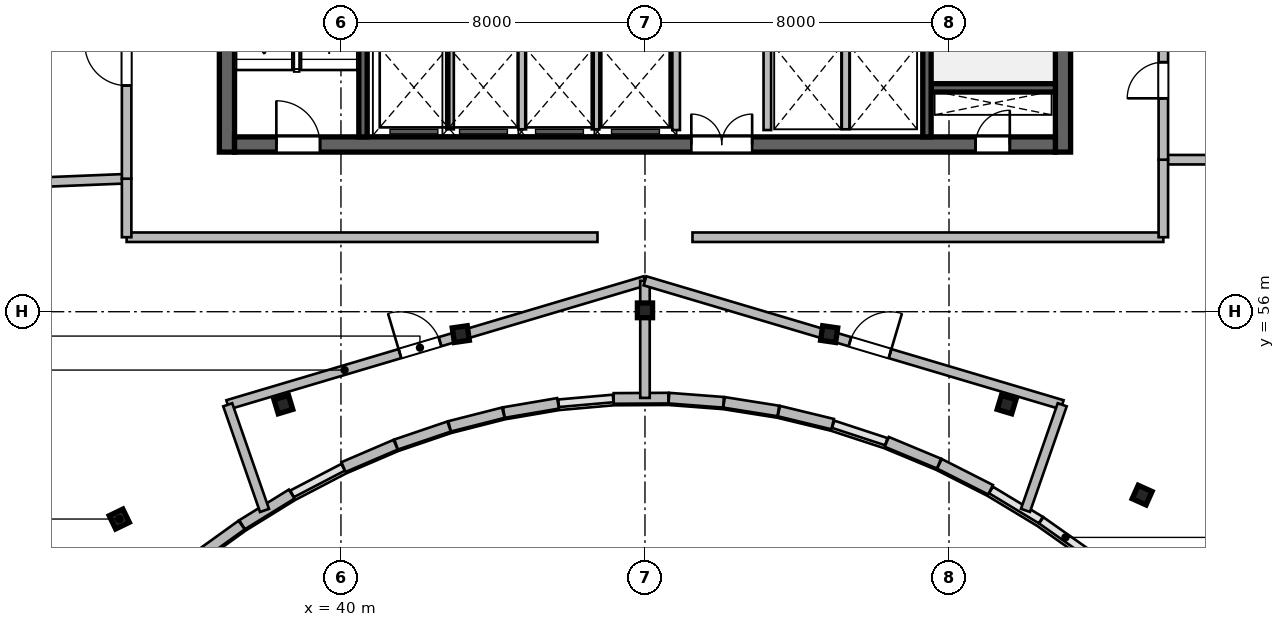
"""IFC4 building model, lengths in metres.
Left out: names, types, materials, properties, quantities, classifications, styles, units other than length and angle.
Written with IfcOpenShell. Run it as: python <this file> out.ifc"""

import sys

from ifc_helpers import new_model, si_unit, direction, frame, frame_2d, origin, origin_2d, place, context, subcontext, project, spatial, rectangle, i_section, extrude, source, transform, mapped, element, fill, save


model = new_model("IFC4")
c1 = context("Model", 3, precision=1e-05, world=origin(), true_north=direction((0.0, 1.0)))
c2 = subcontext(c1, "Body", "Model", "MODEL_VIEW")
j1 = project(units=[si_unit("LENGTHUNIT", "METRE"), si_unit("PLANEANGLEUNIT", "RADIAN")], contexts=[c1])
p1 = place(None, origin())
s1 = spatial("IfcSite", under=j1, at=p1, CompositionType="ELEMENT")
p2 = place(p1, origin())
s2 = spatial("IfcBuilding", under=s1, at=p2, CompositionType="ELEMENT")
p3 = place(p2, frame((0.0, 0.0, 291.3)))
s3 = spatial("IfcBuildingStorey", under=s2, at=p3, CompositionType="ELEMENT", Elevation=291.3)
m1 = source(origin(), c2, "Body", "SweptSolid", [
    extrude(rectangle(XDim=12.0, YDim=0.4, at=frame_2d((6.0, 0.0))), origin(), (0.0, 0.0, 1.0), 3.9),
])
for number, where, z_axis, x_axis in (
    (1, (37.0, 60.2, 0.0), (0.0, 0.0, 1.0), (0.0, 1.0, 0.0)),
    (2, (59.0, 60.2, 0.0), (0.0, 0.0, 1.0), (0.0, 1.0, 0.0)),
):
    element("IfcWall", number, at=place(p3, frame(where, z_axis=z_axis, x_axis=x_axis)), inside=s3, PredefinedType="SHEAR", context=c2, shape_type="MappedRepresentation", body=[
        mapped(m1, transform((0.0, 0.0, 0.0), scale=1.0)),
    ])
m2 = source(origin(), c2, "Body", "SweptSolid", [
    extrude(rectangle(XDim=21.6, YDim=0.4, at=frame_2d((10.8, 0.0))), origin(), (0.0, 0.0, 1.0), 3.9),
])
p4 = place(p3, frame((37.2, 60.4, 0.0), z_axis=(0.0, 0.0, 1.0), x_axis=(1.0, 0.0, 0.0)))
e3 = element("IfcWall", 3, at=p4, inside=s3, PredefinedType="SHEAR", context=c2, shape_type="MappedRepresentation", body=[
    mapped(m2, transform((0.0, 0.0, 0.0), scale=1.0)),
])
p5 = place(p4, frame((1.1, 0.0, 0.0)))
e4 = element("IfcOpeningElement", 4, at=p5, cuts=e3, PredefinedType="OPENING", context=c2, shape_type="SweptSolid", body=[
    extrude(rectangle(XDim=1.15, YDim=2.15, at=frame_2d((0.575, 1.075))), frame((0.0, 0.21, 0.0), z_axis=(0.0, -1.0, 0.0), x_axis=(1.0, 0.0, 0.0)), (0.0, 0.0, 1.0), 0.42),
])
p6 = place(p4, frame((19.5, 0.0, 0.0)))
e5 = element("IfcOpeningElement", 5, at=p6, cuts=e3, PredefinedType="OPENING", context=c2, shape_type="SweptSolid", body=[
    extrude(rectangle(XDim=0.9, YDim=2.1, at=frame_2d((0.45, 1.05))), frame((0.0, 0.21, 0.0), z_axis=(0.0, -1.0, 0.0), x_axis=(1.0, 0.0, 0.0)), (0.0, 0.0, 1.0), 0.42),
])
p7 = place(p4, frame((12.02, 0.0, 0.0)))
e6 = element("IfcOpeningElement", 6, at=p7, cuts=e3, PredefinedType="OPENING", context=c2, shape_type="SweptSolid", body=[
    extrude(rectangle(XDim=1.6, YDim=2.15, at=frame_2d((0.8, 1.075))), frame((0.0, 0.21, 0.0), z_axis=(0.0, -1.0, 0.0), x_axis=(1.0, 0.0, 0.0)), (0.0, 0.0, 1.0), 0.42),
])
m3 = source(origin(), c2, "Body", "SweptSolid", [
    extrude(rectangle(XDim=3.27, YDim=0.22, at=frame_2d((1.635, 0.0))), origin(), (0.0, 0.0, 1.0), 3.9),
])
p8 = place(p3, frame((55.53, 61.89, 0.0), z_axis=(0.0, 0.0, 1.0), x_axis=(1.0, 0.0, 0.0)))
e7 = element("IfcWall", 7, at=p8, inside=s3, PredefinedType="SHEAR", context=c2, shape_type="MappedRepresentation", body=[
    mapped(m3, transform((0.0, 0.0, 0.0), scale=1.0)),
])
m4 = source(origin(), c2, "Body", "SweptSolid", [
    extrude(rectangle(XDim=11.2, YDim=0.22, at=frame_2d((5.6, 0.0))), origin(), (0.0, 0.0, 1.0), 3.9),
])
p9 = place(p3, frame((40.58, 60.6, 0.0), z_axis=(0.0, 0.0, 1.0), x_axis=(0.0, 1.0, 0.0)))
e8 = element("IfcWall", 8, at=p9, inside=s3, PredefinedType="SHEAR", context=c2, shape_type="MappedRepresentation", body=[
    mapped(m4, transform((0.0, 0.0, 0.0), scale=1.0)),
])
p10 = place(p3, frame((55.42, 60.6, 0.0), z_axis=(0.0, 0.0, 1.0), x_axis=(0.0, 1.0, 0.0)))
e9 = element("IfcWall", 9, at=p10, inside=s3, PredefinedType="SHEAR", context=c2, shape_type="MappedRepresentation", body=[
    mapped(m4, transform((0.0, 0.0, 0.0), scale=1.0)),
])
p11 = place(p10, frame((9.645, 0.0, 0.0)))
e10 = element("IfcOpeningElement", 10, at=p11, cuts=e9, PredefinedType="OPENING", context=c2, shape_type="SweptSolid", body=[
    extrude(rectangle(XDim=1.15, YDim=2.15, at=frame_2d((0.575, 1.075))), frame((0.0, 0.12, 0.0), z_axis=(0.0, -1.0, 0.0), x_axis=(1.0, 0.0, 0.0)), (0.0, 0.0, 1.0), 0.24),
])
m5 = source(origin(), c2, "Body", "SweptSolid", [
    extrude(i_section(OverallWidth=0.399, OverallDepth=0.387, WebThickness=0.021, FlangeThickness=0.033, at=origin_2d()), origin(), (0.0, 0.0, 1.0), 3.9),
])
for number, where, z_axis, x_axis in (
    (11, (34.166, 50.545, 0.0), (0.0, 0.0, 1.0), (-0.436, 0.9, 0.0)),
    (12, (38.485, 53.558, 0.0), (0.0, 0.0, 1.0), (-0.289, 0.957, 0.0)),
    (13, (43.154, 55.411, 0.0), (0.0, 0.0, 1.0), (-0.143, 0.99, 0.0)),
    (14, (48.0, 56.036, 0.0), (0.0, 0.0, 1.0), (0.0, 1.0, 0.0)),
    (15, (52.846, 55.411, 0.0), (0.0, 0.0, 1.0), (0.143, 0.99, 0.0)),
    (16, (57.515, 53.558, 0.0), (0.0, 0.0, 1.0), (0.289, 0.957, 0.0)),
    (17, (61.082, 51.175, 0.0), (0.0, 0.0, 1.0), (0.409, 0.912, 0.0)),
):
    element("IfcColumn", number, at=place(p3, frame(where, z_axis=z_axis, x_axis=x_axis)), inside=s3, PredefinedType="COLUMN", context=c2, shape_type="MappedRepresentation", body=[
        mapped(m5, transform((0.0, 0.0, 0.0), scale=1.0)),
    ])
m6 = source(origin(), c2, "Body", "SweptSolid", [
    extrude(rectangle(XDim=1.509, YDim=0.28, at=frame_2d((0.754, 0.0))), origin(), (0.0, 0.0, 1.0), 3.64),
])
p12 = place(p3, frame((57.094, 51.315, 0.0), z_axis=(0.0, 0.0, 1.0), x_axis=(-0.89169189228, 0.452642871635, 0.0)))
e18 = element("IfcWall", 18, at=p12, inside=s3, PredefinedType="SOLIDWALL", context=c2, shape_type="MappedRepresentation", body=[
    mapped(m6, transform((0.0, 0.0, 0.0), scale=1.0)),
])
m7 = source(origin(), c2, "Body", "SweptSolid", [
    extrude(rectangle(XDim=1.488, YDim=0.28, at=frame_2d((0.744, 0.0))), origin(), (0.0, 0.0, 1.0), 3.64),
])
p13 = place(p3, frame((55.736, 52.004, 0.0), z_axis=(0.0, 0.0, 1.0), x_axis=(-0.923261314935, 0.384172545017, 0.0)))
e19 = element("IfcWall", 19, at=p13, inside=s3, PredefinedType="SOLIDWALL", context=c2, shape_type="MappedRepresentation", body=[
    mapped(m7, transform((0.0, 0.0, 0.0), scale=1.0)),
])
m8 = source(origin(), c2, "Body", "SweptSolid", [
    extrude(rectangle(XDim=1.457, YDim=0.28, at=frame_2d((0.728, 0.0))), origin(), (0.0, 0.0, 1.0), 3.64),
])
p14 = place(p3, frame((52.939, 53.042, 0.0), z_axis=(0.0, 0.0, 1.0), x_axis=(-0.97187219902, 0.23550887196, 0.0)))
e20 = element("IfcWall", 20, at=p14, inside=s3, PredefinedType="SOLIDWALL", context=c2, shape_type="MappedRepresentation", body=[
    mapped(m8, transform((0.0, 0.0, 0.0), scale=1.0)),
])
m9 = source(origin(), c2, "Body", "SweptSolid", [
    extrude(rectangle(XDim=1.446, YDim=0.28, at=frame_2d((0.723, 0.0))), origin(), (0.0, 0.0, 1.0), 3.64),
])
p15 = place(p3, frame((51.509, 53.388, 0.0), z_axis=(0.0, 0.0, 1.0), x_axis=(-0.987650460941, 0.156673440642, 0.0)))
e21 = element("IfcWall", 21, at=p15, inside=s3, PredefinedType="SOLIDWALL", context=c2, shape_type="MappedRepresentation", body=[
    mapped(m9, transform((0.0, 0.0, 0.0), scale=1.0)),
])
m10 = source(origin(), c2, "Body", "SweptSolid", [
    extrude(rectangle(XDim=1.44, YDim=0.28, at=frame_2d((0.72, 0.0))), origin(), (0.0, 0.0, 1.0), 3.64),
])
p16 = place(p3, frame((50.066, 53.616, 0.0), z_axis=(0.0, 0.0, 1.0), x_axis=(-0.997124860794, 0.075776064736, 0.0)))
e22 = element("IfcWall", 22, at=p16, inside=s3, PredefinedType="SOLIDWALL", context=c2, shape_type="MappedRepresentation", body=[
    mapped(m10, transform((0.0, 0.0, 0.0), scale=1.0)),
])
m11 = source(origin(), c2, "Body", "SweptSolid", [
    extrude(rectangle(XDim=1.438, YDim=0.28, at=frame_2d((0.719, 0.0))), origin(), (0.0, 0.0, 1.0), 3.64),
])
p17 = place(p3, frame((48.615, 53.726, 0.0), z_axis=(0.0, 0.0, 1.0), x_axis=(-0.999982357135, -0.005940153174, 0.0)))
e23 = element("IfcWall", 23, at=p17, inside=s3, PredefinedType="SOLIDWALL", context=c2, shape_type="MappedRepresentation", body=[
    mapped(m11, transform((0.0, 0.0, 0.0), scale=1.0)),
])
m12 = source(origin(), c2, "Body", "SweptSolid", [
    extrude(rectangle(XDim=1.447, YDim=0.28, at=frame_2d((0.724, 0.0))), origin(), (0.0, 0.0, 1.0), 3.64),
])
p18 = place(p3, frame((45.713, 53.589, 0.0), z_axis=(0.0, 0.0, 1.0), x_axis=(-0.985785525921, -0.168008621461, 0.0)))
e24 = element("IfcWall", 24, at=p18, inside=s3, PredefinedType="SOLIDWALL", context=c2, shape_type="MappedRepresentation", body=[
    mapped(m12, transform((0.0, 0.0, 0.0), scale=1.0)),
])
m13 = source(origin(), c2, "Body", "SweptSolid", [
    extrude(rectangle(XDim=1.458, YDim=0.28, at=frame_2d((0.729, 0.0))), origin(), (0.0, 0.0, 1.0), 3.64),
])
p19 = place(p3, frame((44.271, 53.343, 0.0), z_axis=(0.0, 0.0, 1.0), x_axis=(-0.969109544438, -0.246630677083, 0.0)))
e25 = element("IfcWall", 25, at=p19, inside=s3, PredefinedType="SOLIDWALL", context=c2, shape_type="MappedRepresentation", body=[
    mapped(m13, transform((0.0, 0.0, 0.0), scale=1.0)),
])
m14 = source(origin(), c2, "Body", "SweptSolid", [
    extrude(rectangle(XDim=1.473, YDim=0.28, at=frame_2d((0.736, 0.0))), origin(), (0.0, 0.0, 1.0), 3.64),
])
p20 = place(p3, frame((42.845, 52.979, 0.0), z_axis=(0.0, 0.0, 1.0), x_axis=(-0.946641296917, -0.322289086026, 0.0)))
e26 = element("IfcWall", 26, at=p20, inside=s3, PredefinedType="SOLIDWALL", context=c2, shape_type="MappedRepresentation", body=[
    mapped(m14, transform((0.0, 0.0, 0.0), scale=1.0)),
])
m15 = source(origin(), c2, "Body", "SweptSolid", [
    extrude(rectangle(XDim=1.49, YDim=0.28, at=frame_2d((0.745, 0.0))), origin(), (0.0, 0.0, 1.0), 3.64),
])
p21 = place(p3, frame((41.438, 52.5, 0.0), z_axis=(0.0, 0.0, 1.0), x_axis=(-0.919009427656, -0.394235553799, 0.0)))
e27 = element("IfcWall", 27, at=p21, inside=s3, PredefinedType="SOLIDWALL", context=c2, shape_type="MappedRepresentation", body=[
    mapped(m15, transform((0.0, 0.0, 0.0), scale=1.0)),
])
m16 = source(origin(), c2, "Body", "SweptSolid", [
    extrude(rectangle(XDim=1.535, YDim=0.28, at=frame_2d((0.768, 0.0))), origin(), (0.0, 0.0, 1.0), 3.64),
])
p22 = place(p3, frame((38.704, 51.201, 0.0), z_axis=(0.0, 0.0, 1.0), x_axis=(-0.850756173541, -0.525560589449, 0.0)))
e28 = element("IfcWall", 28, at=p22, inside=s3, PredefinedType="SOLIDWALL", context=c2, shape_type="MappedRepresentation", body=[
    mapped(m16, transform((0.0, 0.0, 0.0), scale=1.0)),
])
m17 = source(origin(), c2, "Body", "SweptSolid", [
    extrude(rectangle(XDim=1.561, YDim=0.28, at=frame_2d((0.781, 0.0))), origin(), (0.0, 0.0, 1.0), 3.64),
])
p23 = place(p3, frame((37.387, 50.387, 0.0), z_axis=(0.0, 0.0, 1.0), x_axis=(-0.81154027425, -0.584296485758, 0.0)))
e29 = element("IfcWall", 29, at=p23, inside=s3, PredefinedType="SOLIDWALL", context=c2, shape_type="MappedRepresentation", body=[
    mapped(m17, transform((0.0, 0.0, 0.0), scale=1.0)),
])
m18 = source(origin(), c2, "Body", "SweptSolid", [
    extrude(rectangle(XDim=2.24, YDim=0.2, at=frame_2d((1.12, 0.0))), origin(), (0.0, 0.0, 1.0), 3.64),
])
for number, where, z_axis, x_axis in (
    (30, (48.82, 60.78, 0.0), (0.0, 0.0, 1.0), (0.0, 1.0, 0.0)),
    (31, (51.22, 60.78, 0.0), (0.0, 0.0, 1.0), (0.0, 1.0, 0.0)),
):
    element("IfcWall", number, at=place(p3, frame(where, z_axis=z_axis, x_axis=x_axis)), inside=s3, PredefinedType="SOLIDWALL", context=c2, shape_type="MappedRepresentation", body=[
        mapped(m18, transform((0.0, 0.0, 0.0), scale=1.0)),
    ])
m19 = source(origin(), c2, "Body", "SweptSolid", [
    extrude(rectangle(XDim=2.2, YDim=0.2, at=frame_2d((1.1, 0.0))), origin(), (0.0, 0.0, 1.0), 3.64),
])
for number, where, z_axis, x_axis in (
    (32, (42.87, 60.8, 0.0), (0.0, 0.0, 1.0), (0.0, 1.0, 0.0)),
    (33, (44.77, 60.8, 0.0), (0.0, 0.0, 1.0), (0.0, 1.0, 0.0)),
    (34, (46.7, 60.8, 0.0), (0.0, 0.0, 1.0), (0.0, 1.0, 0.0)),
    (35, (53.28, 60.8, 0.0), (0.0, 0.0, 1.0), (0.0, 1.0, 0.0)),
):
    element("IfcWall", number, at=place(p3, frame(where, z_axis=z_axis, x_axis=x_axis)), inside=s3, PredefinedType="SOLIDWALL", context=c2, shape_type="MappedRepresentation", body=[
        mapped(m19, transform((0.0, 0.0, 0.0), scale=1.0)),
    ])
m20 = source(origin(), c2, "Body", "SweptSolid", [
    extrude(rectangle(XDim=11.454, YDim=0.25, at=frame_2d((5.727, 0.0))), origin(), (0.0, 0.0, 1.0), 3.314),
])
p24 = place(p3, frame((37.021, 53.552, 0.0), z_axis=(0.0, 0.0, 1.0), x_axis=(0.958594874645, 0.284773359541, 0.0)))
e36 = element("IfcWall", 36, at=p24, inside=s3, PredefinedType="PARTITIONING", context=c2, shape_type="MappedRepresentation", body=[
    mapped(m20, transform((0.0, 0.0, 0.0), scale=1.0)),
])
p25 = place(p24, frame((4.727, 0.0, 0.0)))
e37 = element("IfcOpeningElement", 37, at=p25, cuts=e36, PredefinedType="OPENING", context=c2, shape_type="SweptSolid", body=[
    extrude(rectangle(XDim=1.1, YDim=2.15, at=frame_2d((0.55, 1.075))), frame((0.0, 0.135, 0.0), z_axis=(0.0, -1.0, 0.0), x_axis=(1.0, 0.0, 0.0)), (0.0, 0.0, 1.0), 0.27),
])
m21 = source(origin(), c2, "Body", "SweptSolid", [
    extrude(rectangle(XDim=2.944, YDim=0.25, at=frame_2d((1.472, 0.0))), origin(), (0.0, 0.0, 1.0), 3.64),
])
p26 = place(p3, frame((37.988, 50.771, 0.0), z_axis=(0.0, 0.0, 1.0), x_axis=(-0.328565655286, 0.944481132774, 0.0)))
e38 = element("IfcWall", 38, at=p26, inside=s3, PredefinedType="PARTITIONING", context=c2, shape_type="MappedRepresentation", body=[
    mapped(m21, transform((0.0, 0.0, 0.0), scale=1.0)),
])
m22 = source(origin(), c2, "Body", "SweptSolid", [
    extrude(rectangle(XDim=3.081, YDim=0.25, at=frame_2d((1.54, 0.0))), origin(), (0.0, 0.0, 1.0), 3.314),
])
p27 = place(p3, frame((48.0, 53.733, 0.0), z_axis=(0.0, 0.0, 1.0), x_axis=(0.0, 1.0, 0.0)))
e39 = element("IfcWall", 39, at=p27, inside=s3, PredefinedType="PARTITIONING", context=c2, shape_type="MappedRepresentation", body=[
    mapped(m22, transform((0.0, 0.0, 0.0), scale=1.0)),
])
p28 = place(p3, frame((48.0, 56.813, 0.0), z_axis=(0.0, 0.0, 1.0), x_axis=(0.958594874645, -0.284773359541, 0.0)))
e40 = element("IfcWall", 40, at=p28, inside=s3, PredefinedType="PARTITIONING", context=c2, shape_type="MappedRepresentation", body=[
    mapped(m20, transform((0.0, 0.0, 0.0), scale=1.0)),
])
p29 = place(p28, frame((5.627, 0.0, 0.0)))
e41 = element("IfcOpeningElement", 41, at=p29, cuts=e40, PredefinedType="OPENING", context=c2, shape_type="SweptSolid", body=[
    extrude(rectangle(XDim=1.1, YDim=2.15, at=frame_2d((0.55, 1.075))), frame((0.0, 0.135, 0.0), z_axis=(0.0, -1.0, 0.0), x_axis=(1.0, 0.0, 0.0)), (0.0, 0.0, 1.0), 0.27),
])
m23 = source(origin(), c2, "Body", "SweptSolid", [
    extrude(rectangle(XDim=2.942, YDim=0.25, at=frame_2d((1.471, 0.0))), origin(), (0.0, 0.0, 1.0), 3.64),
])
p30 = place(p3, frame((58.013, 50.773, 0.0), z_axis=(0.0, 0.0, 1.0), x_axis=(0.328623620494, 0.944460965871, 0.0)))
e42 = element("IfcWall", 42, at=p30, inside=s3, PredefinedType="PARTITIONING", context=c2, shape_type="MappedRepresentation", body=[
    mapped(m23, transform((0.0, 0.0, 0.0), scale=1.0)),
])
m24 = source(origin(), c2, "Body", "SweptSolid", [
    extrude(rectangle(XDim=12.39, YDim=0.25, at=frame_2d((6.195, 0.0))), origin(), (0.0, 0.0, 1.0), 3.64),
])
for number, where, z_axis, x_axis in (
    (43, (34.36, 57.96, 0.0), (0.0, 0.0, 1.0), (1.0, 0.0, 0.0)),
    (44, (49.25, 57.96, 0.0), (0.0, 0.0, 1.0), (1.0, 0.0, 0.0)),
):
    element("IfcWall", number, at=place(p3, frame(where, z_axis=z_axis, x_axis=x_axis)), inside=s3, PredefinedType="PARTITIONING", context=c2, shape_type="MappedRepresentation", body=[
        mapped(m24, transform((0.0, 0.0, 0.0), scale=1.0)),
    ])
m25 = source(origin(), c2, "Body", "SweptSolid", [
    extrude(rectangle(XDim=13.499, YDim=0.25, at=frame_2d((6.75, 0.0))), origin(), (0.0, 0.0, 1.0), 3.64),
])
p31 = place(p3, frame((20.872, 58.951, 0.0), z_axis=(0.0, 0.0, 1.0), x_axis=(0.999172424054, 0.04067513995, 0.0)))
e45 = element("IfcWall", 45, at=p31, inside=s3, PredefinedType="PARTITIONING", context=c2, shape_type="MappedRepresentation", body=[
    mapped(m25, transform((0.0, 0.0, 0.0), scale=1.0)),
])
m26 = source(origin(), c2, "Body", "SweptSolid", [
    extrude(rectangle(XDim=1.54, YDim=0.25, at=frame_2d((0.77, 0.0))), origin(), (0.0, 0.0, 1.0), 3.64),
])
p32 = place(p3, frame((34.36, 57.96, 0.0), z_axis=(0.0, 0.0, 1.0), x_axis=(0.0, 1.0, 0.0)))
e46 = element("IfcWall", 46, at=p32, inside=s3, PredefinedType="PARTITIONING", context=c2, shape_type="MappedRepresentation", body=[
    mapped(m26, transform((0.0, 0.0, 0.0), scale=1.0)),
])
m27 = source(origin(), c2, "Body", "SweptSolid", [
    extrude(rectangle(XDim=6.0, YDim=0.25, at=frame_2d((3.0, 0.0))), origin(), (0.0, 0.0, 1.0), 3.64),
])
p33 = place(p3, frame((34.36, 59.5, 0.0), z_axis=(0.0, 0.0, 1.0), x_axis=(0.0, 1.0, 0.0)))
e47 = element("IfcWall", 47, at=p33, inside=s3, PredefinedType="PARTITIONING", context=c2, shape_type="MappedRepresentation", body=[
    mapped(m27, transform((0.0, 0.0, 0.0), scale=1.0)),
])
p34 = place(p33, frame((2.45, 0.0, 0.0)))
e48 = element("IfcOpeningElement", 48, at=p34, cuts=e47, PredefinedType="OPENING", context=c2, shape_type="SweptSolid", body=[
    extrude(rectangle(XDim=1.1, YDim=2.15, at=frame_2d((0.55, 1.075))), frame((0.0, 0.135, 0.0), z_axis=(0.0, -1.0, 0.0), x_axis=(1.0, 0.0, 0.0)), (0.0, 0.0, 1.0), 0.27),
])
m28 = source(origin(), c2, "Body", "SweptSolid", [
    extrude(rectangle(XDim=11.633, YDim=0.25, at=frame_2d((5.816, 0.0))), origin(), (0.0, 0.0, 1.0), 3.64),
])
p35 = place(p3, frame((61.64, 60.0, 0.0), z_axis=(0.0, 0.0, 1.0), x_axis=(1.0, 0.0, 0.0)))
e49 = element("IfcWall", 49, at=p35, inside=s3, PredefinedType="PARTITIONING", context=c2, shape_type="MappedRepresentation", body=[
    mapped(m28, transform((0.0, 0.0, 0.0), scale=1.0)),
])
m29 = source(origin(), c2, "Body", "SweptSolid", [
    extrude(rectangle(XDim=2.04, YDim=0.25, at=frame_2d((1.02, 0.0))), origin(), (0.0, 0.0, 1.0), 3.64),
])
p36 = place(p3, frame((61.64, 57.96, 0.0), z_axis=(0.0, 0.0, 1.0), x_axis=(0.0, 1.0, 0.0)))
e50 = element("IfcWall", 50, at=p36, inside=s3, PredefinedType="PARTITIONING", context=c2, shape_type="MappedRepresentation", body=[
    mapped(m29, transform((0.0, 0.0, 0.0), scale=1.0)),
])
m30 = source(origin(), c2, "Body", "SweptSolid", [
    extrude(rectangle(XDim=5.5, YDim=0.25, at=frame_2d((2.75, 0.0))), origin(), (0.0, 0.0, 1.0), 3.64),
])
p37 = place(p3, frame((61.64, 60.0, 0.0), z_axis=(0.0, 0.0, 1.0), x_axis=(0.0, 1.0, 0.0)))
e51 = element("IfcWall", 51, at=p37, inside=s3, PredefinedType="PARTITIONING", context=c2, shape_type="MappedRepresentation", body=[
    mapped(m30, transform((0.0, 0.0, 0.0), scale=1.0)),
])
p38 = place(p37, frame((1.615, 0.0, 0.0)))
e52 = element("IfcOpeningElement", 52, at=p38, cuts=e51, PredefinedType="OPENING", context=c2, shape_type="SweptSolid", body=[
    extrude(rectangle(XDim=0.95, YDim=2.1, at=frame_2d((0.475, 1.05))), frame((0.0, 0.135, 0.0), z_axis=(0.0, -1.0, 0.0), x_axis=(1.0, 0.0, 0.0)), (0.0, 0.0, 1.0), 0.27),
])
m31 = source(origin(), c2, "Body", "SweptSolid", [
    extrude(rectangle(XDim=1.15, YDim=2.15, at=frame_2d((0.575, 1.075))), frame((0.0, 0.025, 0.0), z_axis=(0.0, -1.0, 0.0), x_axis=(1.0, 0.0, 0.0)), (0.0, 0.0, 1.0), 0.05),
])
p39 = place(p5, origin())
e53 = element("IfcDoor", 53, at=p39, inside=s3, OperationType="SINGLE_SWING_LEFT", PredefinedType="DOOR", context=c2, shape_type="MappedRepresentation", body=[
    mapped(m31, transform((0.0, 0.0, 0.0), scale=1.0)),
])
fill(e4, e53)
m32 = source(origin(), c2, "Body", "SweptSolid", [
    extrude(rectangle(XDim=0.9, YDim=2.1, at=frame_2d((0.45, 1.05))), frame((0.0, 0.025, 0.0), z_axis=(0.0, -1.0, 0.0), x_axis=(1.0, 0.0, 0.0)), (0.0, 0.0, 1.0), 0.05),
])
p40 = place(p6, origin())
e54 = element("IfcDoor", 54, at=p40, inside=s3, OperationType="SINGLE_SWING_RIGHT", PredefinedType="DOOR", context=c2, shape_type="MappedRepresentation", body=[
    mapped(m32, transform((0.0, 0.0, 0.0), scale=1.0)),
])
fill(e5, e54)
m33 = source(origin(), c2, "Body", "SweptSolid", [
    extrude(rectangle(XDim=1.6, YDim=2.15, at=frame_2d((0.8, 1.075))), frame((0.0, 0.025, 0.0), z_axis=(0.0, -1.0, 0.0), x_axis=(1.0, 0.0, 0.0)), (0.0, 0.0, 1.0), 0.05),
])
p41 = place(p7, origin())
e55 = element("IfcDoor", 55, at=p41, inside=s3, OperationType="DOUBLE_DOOR_SINGLE_SWING", PredefinedType="DOOR", context=c2, shape_type="MappedRepresentation", body=[
    mapped(m33, transform((0.0, 0.0, 0.0), scale=1.0)),
])
fill(e6, e55)
m34 = source(origin(), c2, "Body", "SweptSolid", [
    extrude(rectangle(XDim=1.1, YDim=2.15, at=frame_2d((0.55, 1.075))), frame((0.0, 0.025, 0.0), z_axis=(0.0, -1.0, 0.0), x_axis=(1.0, 0.0, 0.0)), (0.0, 0.0, 1.0), 0.05),
])
p42 = place(p25, origin())
e56 = element("IfcDoor", 56, at=p42, inside=s3, OperationType="SINGLE_SWING_LEFT", PredefinedType="DOOR", context=c2, shape_type="MappedRepresentation", body=[
    mapped(m34, transform((0.0, 0.0, 0.0), scale=1.0)),
])
fill(e37, e56)
p43 = place(p29, origin())
e57 = element("IfcDoor", 57, at=p43, inside=s3, OperationType="SINGLE_SWING_RIGHT", PredefinedType="DOOR", context=c2, shape_type="MappedRepresentation", body=[
    mapped(m34, transform((0.0, 0.0, 0.0), scale=1.0)),
])
fill(e41, e57)
p44 = place(p34, origin())
e58 = element("IfcDoor", 58, at=p44, inside=s3, OperationType="SINGLE_SWING_RIGHT", PredefinedType="DOOR", context=c2, shape_type="MappedRepresentation", body=[
    mapped(m34, transform((0.0, 0.0, 0.0), scale=1.0)),
])
fill(e48, e58)
m35 = source(origin(), c2, "Body", "SweptSolid", [
    extrude(rectangle(XDim=0.95, YDim=2.1, at=frame_2d((0.475, 1.05))), frame((0.0, 0.025, 0.0), z_axis=(0.0, -1.0, 0.0), x_axis=(1.0, 0.0, 0.0)), (0.0, 0.0, 1.0), 0.05),
])
p45 = place(p38, origin())
e59 = element("IfcDoor", 59, at=p45, inside=s3, OperationType="SINGLE_SWING_LEFT", PredefinedType="DOOR", context=c2, shape_type="MappedRepresentation", body=[
    mapped(m35, transform((0.0, 0.0, 0.0), scale=1.0)),
])
fill(e52, e59)
save(model, sys.argv[1])
